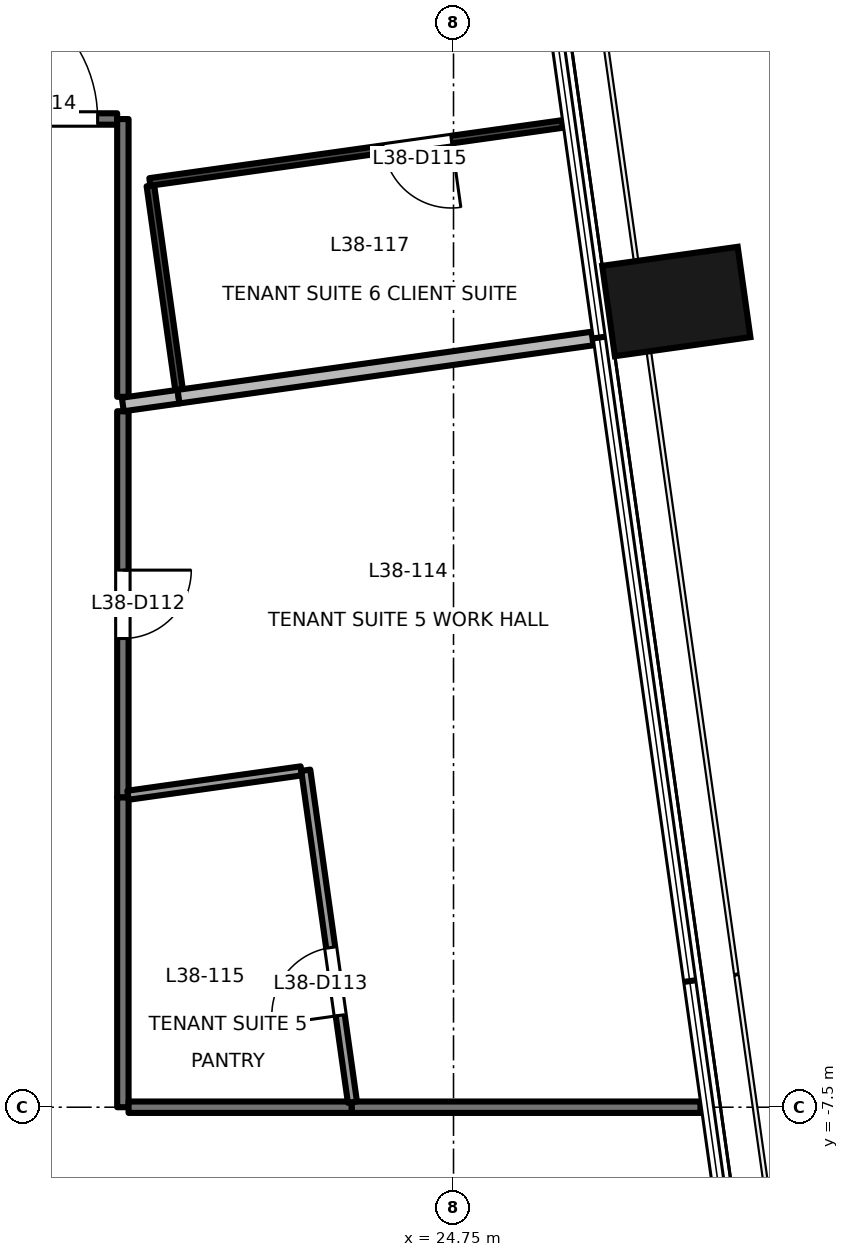
"""IFC4 building model, lengths in metres.
Left out: names, types, materials, properties, quantities, classifications, styles, units other than length and angle.
Written with IfcOpenShell. Run it as: python <this file> out.ifc"""

import sys

from ifc_helpers import new_model, si_unit, direction, frame, frame_2d, origin, origin_2d, place, context, subcontext, project, spatial, rectangle, extrude, element, fill, save


model = new_model("IFC4")
c1 = context("Model", 3, precision=1e-05, world=origin(), true_north=direction((0.0, 1.0)))
c2 = subcontext(c1, "Body", "Model", "MODEL_VIEW")
j1 = project(units=[si_unit("LENGTHUNIT", "METRE"), si_unit("PLANEANGLEUNIT", "RADIAN")], contexts=[c1])
p1 = place(None, origin())
s1 = spatial("IfcSite", under=j1, at=p1, CompositionType="ELEMENT")
p2 = place(p1, origin())
s2 = spatial("IfcBuilding", under=s1, at=p2, CompositionType="ELEMENT")
p3 = place(p2, frame((0.0, 0.0, 168.5)))
s3 = spatial("IfcBuildingStorey", under=s2, at=p3, CompositionType="ELEMENT", Elevation=168.5)
p4 = place(p3, frame((27.681, 3.1, -0.2), z_axis=(0.0, 0.0, 1.0), x_axis=(-0.139190384377, 0.990265639562, 0.0)))
e1 = element("IfcColumn", 1, at=p4, inside=s3, PredefinedType="COLUMN", context=c2, shape_type="SweptSolid", body=[
    extrude(rectangle(XDim=1.2, YDim=1.8, at=origin_2d()), origin(), (0.0, 0.0, 1.0), 3.9),
])
p5 = place(p3, frame((20.4, 1.656, 0.0), z_axis=(0.0, 0.0, 1.0), x_axis=(0.0, -1.0, 0.0)))
e2 = element("IfcWall", 2, at=p5, inside=s3, PredefinedType="PARTITIONING", context=c2, shape_type="SweptSolid", body=[
    extrude(rectangle(XDim=5.081, YDim=0.15, at=frame_2d((2.541, 0.0))), origin(), (0.0, 0.0, 1.0), 3.25),
])
p6 = place(p5, frame((2.09, 0.0, 0.0)))
e3 = element("IfcOpeningElement", 3, at=p6, cuts=e2, PredefinedType="OPENING", context=c2, shape_type="SweptSolid", body=[
    extrude(rectangle(XDim=0.9, YDim=2.1, at=frame_2d((0.45, 1.05))), frame((0.0, 0.085, 0.0), z_axis=(0.0, -1.0, 0.0), x_axis=(1.0, 0.0, 0.0)), (0.0, 0.0, 1.0), 0.171),
])
p7 = place(p3, frame((23.409, -7.5, 0.0), z_axis=(0.0, 0.0, 1.0), x_axis=(1.0, 0.0, 0.0)))
e4 = element("IfcWall", 4, at=p7, inside=s3, PredefinedType="PARTITIONING", context=c2, shape_type="SweptSolid", body=[
    extrude(rectangle(XDim=4.59, YDim=0.15, at=frame_2d((2.295, 0.0))), origin(), (0.0, 0.0, 1.0), 3.7),
])
p8 = place(p3, frame((20.4, -3.425, 0.0), z_axis=(0.0, 0.0, 1.0), x_axis=(0.0, -1.0, 0.0)))
e5 = element("IfcWall", 5, at=p8, inside=s3, PredefinedType="PARTITIONING", context=c2, shape_type="SweptSolid", body=[
    extrude(rectangle(XDim=4.075, YDim=0.15, at=frame_2d((2.038, 0.0))), origin(), (0.0, 0.0, 1.0), 3.25),
])
p9 = place(p3, frame((20.475, -7.5, 0.0), z_axis=(0.0, 0.0, 1.0), x_axis=(1.0, 0.0, 0.0)))
e6 = element("IfcWall", 6, at=p9, inside=s3, PredefinedType="PARTITIONING", context=c2, shape_type="SweptSolid", body=[
    extrude(rectangle(XDim=2.934, YDim=0.15, at=frame_2d((1.467, 0.0))), origin(), (0.0, 0.0, 1.0), 3.7),
])
p10 = place(p3, frame((18.0, 5.501, 0.0), z_axis=(0.0, 0.0, 1.0), x_axis=(1.0, 0.0, 0.0)))
e7 = element("IfcWall", 7, at=p10, inside=s3, PredefinedType="PARTITIONING", context=c2, shape_type="SweptSolid", body=[
    extrude(rectangle(XDim=2.325, YDim=0.15, at=frame_2d((1.163, 0.0))), origin(), (0.0, 0.0, 1.0), 3.7),
])
p11 = place(p10, frame((0.268, 0.0, 0.0)))
e8 = element("IfcOpeningElement", 8, at=p11, cuts=e7, PredefinedType="OPENING", context=c2, shape_type="SweptSolid", body=[
    extrude(rectangle(XDim=1.8, YDim=2.1, at=frame_2d((0.9, 1.05))), frame((0.0, 0.085, 0.0), z_axis=(0.0, -1.0, 0.0), x_axis=(1.0, 0.0, 0.0)), (0.0, 0.0, 1.0), 0.171),
])
p12 = place(p3, frame((20.4, 5.5, 0.0), z_axis=(0.0, 0.0, 1.0), x_axis=(0.0, -1.0, 0.0)))
e9 = element("IfcWall", 9, at=p12, inside=s3, PredefinedType="PARTITIONING", context=c2, shape_type="SweptSolid", body=[
    extrude(rectangle(XDim=3.654, YDim=0.15, at=frame_2d((1.827, 0.0))), origin(), (0.0, 0.0, 1.0), 3.25),
])
p13 = place(p3, frame((22.747, -3.075, 0.0), z_axis=(0.0, 0.0, 1.0), x_axis=(-0.990231660618, -0.139431912808, 0.0)))
e10 = element("IfcWall", 10, at=p13, inside=s3, PredefinedType="PARTITIONING", context=c2, shape_type="SweptSolid", body=[
    extrude(rectangle(XDim=2.302, YDim=0.12, at=frame_2d((1.151, 0.0))), origin(), (0.0, 0.0, 1.0), 3.7),
])
p14 = place(p3, frame((23.42, -7.433, 0.0), z_axis=(0.0, 0.0, 1.0), x_axis=(-0.13925822498, 0.99025610161, 0.0)))
e11 = element("IfcWall", 11, at=p14, inside=s3, PredefinedType="PARTITIONING", context=c2, shape_type="SweptSolid", body=[
    extrude(rectangle(XDim=4.409, YDim=0.12, at=frame_2d((2.205, 0.0))), origin(), (0.0, 0.0, 1.0), 3.25),
])
p15 = place(p14, frame((1.153, 0.0, 0.0)))
e12 = element("IfcOpeningElement", 12, at=p15, cuts=e11, PredefinedType="OPENING", context=c2, shape_type="SweptSolid", body=[
    extrude(rectangle(XDim=0.9, YDim=2.1, at=frame_2d((0.45, 1.05))), frame((0.0, 0.071, 0.0), z_axis=(0.0, -1.0, 0.0), x_axis=(1.0, 0.0, 0.0)), (0.0, 0.0, 1.0), 0.141),
])
p16 = place(p3, frame((20.399, 1.745, 0.0), z_axis=(0.0, 0.0, 1.0), x_axis=(0.990315465901, 0.138835434947, 0.0)))
e13 = element("IfcWall", 13, at=p16, inside=s3, PredefinedType="PARTITIONING", context=c2, shape_type="SweptSolid", body=[
    extrude(rectangle(XDim=0.74, YDim=0.18, at=frame_2d((0.37, 0.0))), origin(), (0.0, 0.0, 1.0), 3.7),
])
p17 = place(p3, frame((21.132, 1.848, 0.0), z_axis=(0.0, 0.0, 1.0), x_axis=(0.990277893792, 0.139103174181, 0.0)))
e14 = element("IfcWall", 14, at=p17, inside=s3, PredefinedType="PARTITIONING", context=c2, shape_type="SweptSolid", body=[
    extrude(rectangle(XDim=5.5, YDim=0.18, at=frame_2d((2.75, 0.0))), origin(), (0.0, 0.0, 1.0), 3.7),
])
p18 = place(p3, frame((20.762, 4.623, 0.0), z_axis=(0.0, 0.0, 1.0), x_axis=(0.139125052108, -0.990274820379, 0.0)))
e15 = element("IfcWall", 15, at=p18, inside=s3, PredefinedType="PARTITIONING", context=c2, shape_type="SweptSolid", body=[
    extrude(rectangle(XDim=2.709, YDim=0.1, at=frame_2d((1.355, 0.0))), origin(), (0.0, 0.0, 1.0), 3.25),
])
p19 = place(p3, frame((26.181, 5.435, 0.0), z_axis=(0.0, 0.0, 1.0), x_axis=(-0.990283537783, -0.13906298859, 0.0)))
e16 = element("IfcWall", 16, at=p19, inside=s3, PredefinedType="PARTITIONING", context=c2, shape_type="SweptSolid", body=[
    extrude(rectangle(XDim=5.479, YDim=0.1, at=frame_2d((2.74, 0.0))), origin(), (0.0, 0.0, 1.0), 3.7),
])
p20 = place(p19, frame((1.474, 0.0, 0.0)))
e17 = element("IfcOpeningElement", 17, at=p20, cuts=e16, PredefinedType="OPENING", context=c2, shape_type="SweptSolid", body=[
    extrude(rectangle(XDim=0.9, YDim=2.1, at=frame_2d((0.45, 1.05))), frame((0.0, 0.061, 0.0), z_axis=(0.0, -1.0, 0.0), x_axis=(1.0, 0.0, 0.0)), (0.0, 0.0, 1.0), 0.121),
])
p21 = place(p6, origin())
e18 = element("IfcDoor", 18, at=p21, inside=s3, OperationType="SINGLE_SWING_LEFT", PredefinedType="DOOR", context=c2, shape_type="SweptSolid", body=[
    extrude(rectangle(XDim=0.9, YDim=2.1, at=frame_2d((0.45, 1.05))), frame((0.0, 0.025, 0.0), z_axis=(0.0, -1.0, 0.0), x_axis=(1.0, 0.0, 0.0)), (0.0, 0.0, 1.0), 0.05),
])
fill(e3, e18)
p22 = place(p15, origin())
e19 = element("IfcDoor", 19, at=p22, inside=s3, OperationType="SINGLE_SWING_LEFT", PredefinedType="DOOR", context=c2, shape_type="SweptSolid", body=[
    extrude(rectangle(XDim=0.9, YDim=2.1, at=frame_2d((0.45, 1.05))), frame((0.0, 0.025, 0.0), z_axis=(0.0, -1.0, 0.0), x_axis=(1.0, 0.0, 0.0)), (0.0, 0.0, 1.0), 0.05),
])
fill(e12, e19)
p23 = place(p11, origin())
e20 = element("IfcDoor", 20, at=p23, inside=s3, OperationType="DOUBLE_DOOR_SINGLE_SWING", PredefinedType="DOOR", context=c2, shape_type="SweptSolid", body=[
    extrude(rectangle(XDim=1.8, YDim=2.1, at=frame_2d((0.9, 1.05))), frame((0.0, 0.025, 0.0), z_axis=(0.0, -1.0, 0.0), x_axis=(1.0, 0.0, 0.0)), (0.0, 0.0, 1.0), 0.05),
])
fill(e8, e20)
p24 = place(p20, origin())
e21 = element("IfcDoor", 21, at=p24, inside=s3, OperationType="SINGLE_SWING_LEFT", PredefinedType="DOOR", context=c2, shape_type="SweptSolid", body=[
    extrude(rectangle(XDim=0.9, YDim=2.1, at=frame_2d((0.45, 1.05))), frame((0.0, 0.025, 0.0), z_axis=(0.0, -1.0, 0.0), x_axis=(1.0, 0.0, 0.0)), (0.0, 0.0, 1.0), 0.05),
])
fill(e17, e21)
save(model, sys.argv[1])
